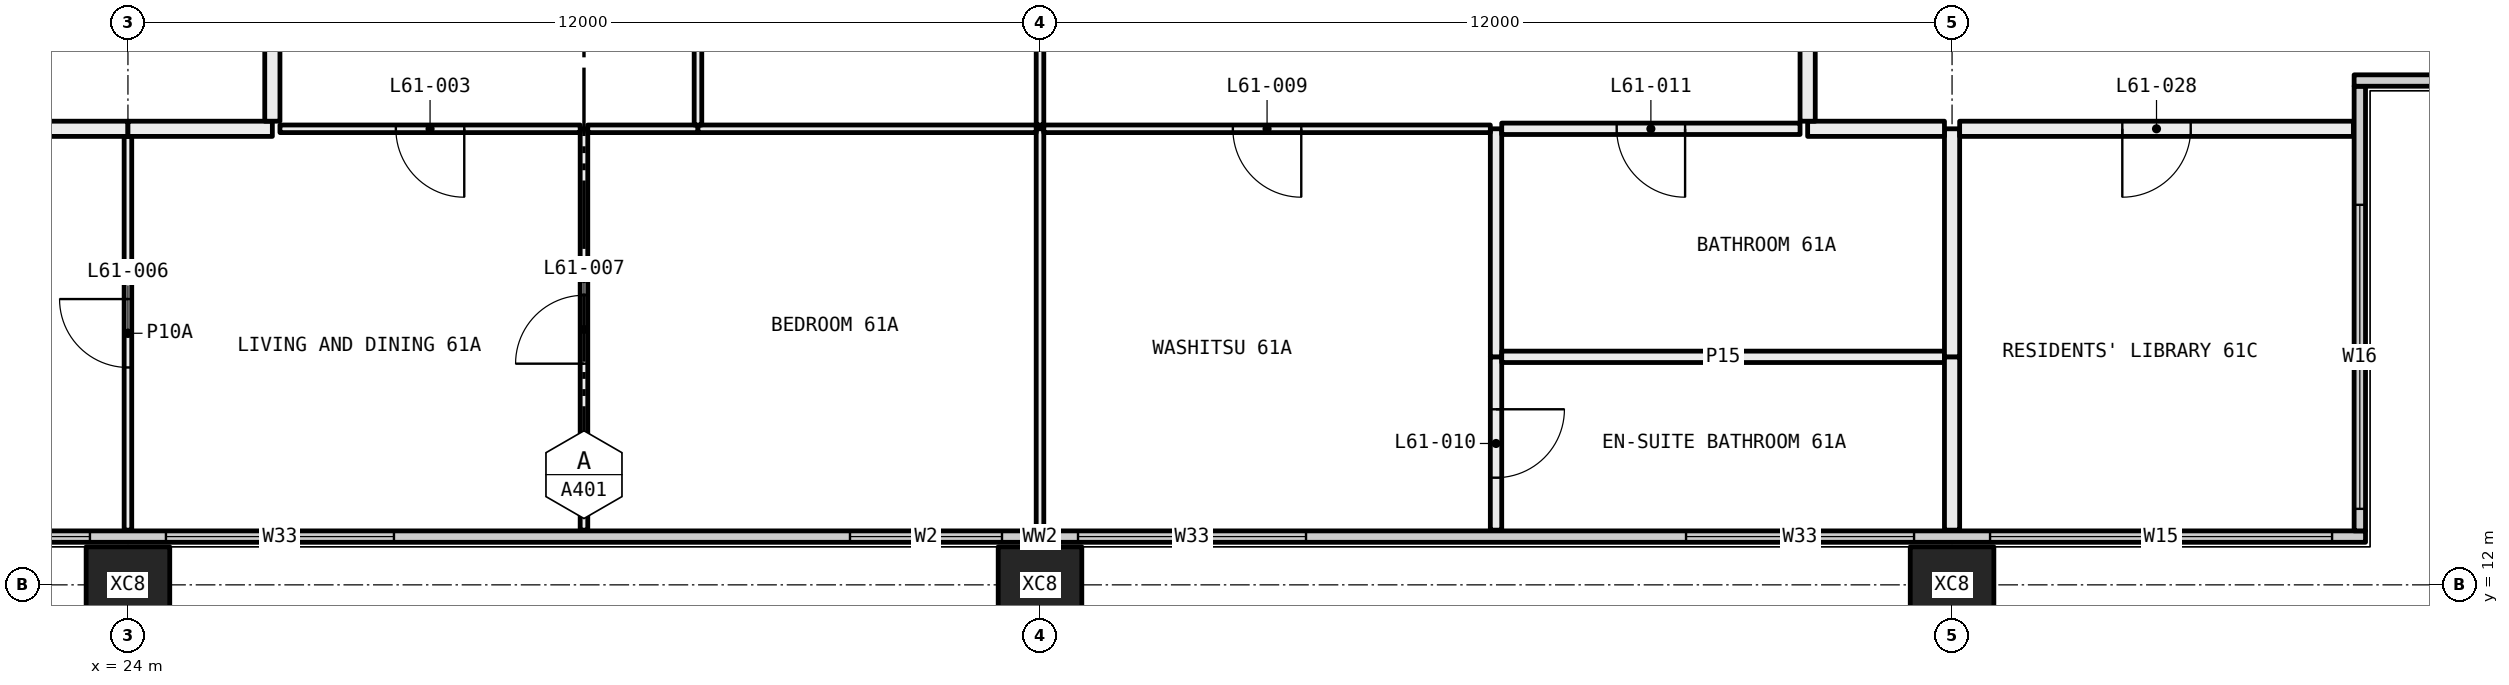
"""IFC4 building model, lengths in metres.
Left out: names, types, materials, properties, quantities, classifications, styles, units other than length and angle.
Written with IfcOpenShell. Run it as: python <this file> out.ifc"""

import sys

from ifc_helpers import new_model, si_unit, direction, frame, frame_2d, origin, origin_2d, place, context, subcontext, project, spatial, rectangle, hollow_rectangle, extrude, element, fill, save


model = new_model("IFC4")
c1 = context("Model", 3, precision=1e-05, world=origin(), true_north=direction((0.0, 1.0)))
c2 = subcontext(c1, "Body", "Model", "MODEL_VIEW")
j1 = project(units=[si_unit("LENGTHUNIT", "METRE"), si_unit("PLANEANGLEUNIT", "RADIAN")], contexts=[c1])
p1 = place(None, origin())
s1 = spatial("IfcSite", under=j1, at=p1, CompositionType="ELEMENT")
p2 = place(p1, origin())
s2 = spatial("IfcBuilding", under=s1, at=p2, CompositionType="ELEMENT")
p3 = place(p2, frame((0.0, 0.0, 228.3)))
s3 = spatial("IfcBuildingStorey", under=s2, at=p3, CompositionType="ELEMENT", Elevation=228.3)
for number, where, z_axis, x_axis in (
    (1, (24.0, 12.0, -0.4), (0.0, 0.0, 1.0), (1.0, 0.0, 0.0)),
    (2, (36.0, 12.0, -0.4), (0.0, 0.0, 1.0), (1.0, 0.0, 0.0)),
    (3, (48.0, 12.0, -0.4), (0.0, 0.0, 1.0), (1.0, 0.0, 0.0)),
):
    element("IfcColumn", number, at=place(p3, frame(where, z_axis=z_axis, x_axis=x_axis)), inside=s3, PredefinedType="COLUMN", context=c2, shape_type="SweptSolid", body=[
        extrude(hollow_rectangle(XDim=1.1, YDim=1.0, WallThickness=0.04, at=origin_2d()), origin(), (0.0, 0.0, 1.0), 3.45),
    ])
p4 = place(p3, frame((18.56, 12.635, 0.0), z_axis=(0.0, 0.0, 1.0), x_axis=(1.0, 0.0, 0.0)))
e4 = element("IfcWall", 4, at=p4, inside=s3, PredefinedType="ELEMENTEDWALL", context=c2, shape_type="SweptSolid", body=[
    extrude(rectangle(XDim=34.88, YDim=0.15, at=frame_2d((17.44, 0.0))), origin(), (0.0, 0.0, 1.0), 3.05),
])
p5 = place(p4, frame((0.44, 0.0, 0.45)))
e5 = element("IfcOpeningElement", 5, at=p5, cuts=e4, PredefinedType="OPENING", context=c2, shape_type="SweptSolid", body=[
    extrude(rectangle(XDim=4.5, YDim=2.55, at=frame_2d((2.25, 1.275))), frame((0.0, 0.085, 0.0), z_axis=(0.0, -1.0, 0.0), x_axis=(1.0, 0.0, 0.0)), (0.0, 0.0, 1.0), 0.17),
])
p6 = place(p4, frame((5.94, 0.0, 0.45)))
e6 = element("IfcOpeningElement", 6, at=p6, cuts=e4, PredefinedType="OPENING", context=c2, shape_type="SweptSolid", body=[
    extrude(rectangle(XDim=3.0, YDim=2.55, at=frame_2d((1.5, 1.275))), frame((0.0, 0.085, 0.0), z_axis=(0.0, -1.0, 0.0), x_axis=(1.0, 0.0, 0.0)), (0.0, 0.0, 1.0), 0.17),
])
p7 = place(p4, frame((14.94, 0.0, 0.45)))
e7 = element("IfcOpeningElement", 7, at=p7, cuts=e4, PredefinedType="OPENING", context=c2, shape_type="SweptSolid", body=[
    extrude(rectangle(XDim=2.0, YDim=2.55, at=frame_2d((1.0, 1.275))), frame((0.0, 0.085, 0.0), z_axis=(0.0, -1.0, 0.0), x_axis=(1.0, 0.0, 0.0)), (0.0, 0.0, 1.0), 0.17),
])
p8 = place(p4, frame((17.94, 0.0, 0.45)))
e8 = element("IfcOpeningElement", 8, at=p8, cuts=e4, PredefinedType="OPENING", context=c2, shape_type="SweptSolid", body=[
    extrude(rectangle(XDim=3.0, YDim=2.55, at=frame_2d((1.5, 1.275))), frame((0.0, 0.085, 0.0), z_axis=(0.0, -1.0, 0.0), x_axis=(1.0, 0.0, 0.0)), (0.0, 0.0, 1.0), 0.17),
])
p9 = place(p4, frame((25.94, 0.0, 0.45)))
e9 = element("IfcOpeningElement", 9, at=p9, cuts=e4, PredefinedType="OPENING", context=c2, shape_type="SweptSolid", body=[
    extrude(rectangle(XDim=3.0, YDim=2.55, at=frame_2d((1.5, 1.275))), frame((0.0, 0.085, 0.0), z_axis=(0.0, -1.0, 0.0), x_axis=(1.0, 0.0, 0.0)), (0.0, 0.0, 1.0), 0.17),
])
p10 = place(p4, frame((29.94, 0.0, 0.45)))
e10 = element("IfcOpeningElement", 10, at=p10, cuts=e4, PredefinedType="OPENING", context=c2, shape_type="SweptSolid", body=[
    extrude(rectangle(XDim=4.5, YDim=2.55, at=frame_2d((2.25, 1.275))), frame((0.0, 0.085, 0.0), z_axis=(0.0, -1.0, 0.0), x_axis=(1.0, 0.0, 0.0)), (0.0, 0.0, 1.0), 0.17),
])
p11 = place(p3, frame((53.365, 12.71, 0.0), z_axis=(0.0, 0.0, 1.0), x_axis=(0.0, 1.0, 0.0)))
e11 = element("IfcWall", 11, at=p11, inside=s3, PredefinedType="ELEMENTEDWALL", context=c2, shape_type="SweptSolid", body=[
    extrude(rectangle(XDim=5.85, YDim=0.15, at=frame_2d((2.925, 0.0))), origin(), (0.0, 0.0, 1.0), 3.05),
])
p12 = place(p11, frame((0.29, 0.0, 0.45)))
e12 = element("IfcOpeningElement", 12, at=p12, cuts=e11, PredefinedType="OPENING", context=c2, shape_type="SweptSolid", body=[
    extrude(rectangle(XDim=4.0, YDim=2.55, at=frame_2d((2.0, 1.275))), frame((0.0, 0.085, 0.0), z_axis=(0.0, -1.0, 0.0), x_axis=(1.0, 0.0, 0.0)), (0.0, 0.0, 1.0), 0.17),
])
p13 = place(p3, frame((53.29, 18.635, 0.0), z_axis=(0.0, 0.0, 1.0), x_axis=(1.0, 0.0, 0.0)))
e13 = element("IfcWall", 13, at=p13, inside=s3, PredefinedType="ELEMENTEDWALL", context=c2, shape_type="SweptSolid", body=[
    extrude(rectangle(XDim=6.15, YDim=0.15, at=frame_2d((3.075, 0.0))), origin(), (0.0, 0.0, 1.0), 3.05),
])
p14 = place(p13, frame((1.71, 0.0, 0.45)))
e14 = element("IfcOpeningElement", 14, at=p14, cuts=e13, PredefinedType="OPENING", context=c2, shape_type="SweptSolid", body=[
    extrude(rectangle(XDim=4.0, YDim=2.55, at=frame_2d((2.0, 1.275))), frame((0.0, 0.085, 0.0), z_axis=(0.0, -1.0, 0.0), x_axis=(1.0, 0.0, 0.0)), (0.0, 0.0, 1.0), 0.17),
])
p15 = place(p3, frame((24.0, 12.72, 0.0), z_axis=(0.0, 0.0, 1.0), x_axis=(0.0, 1.0, 0.0)))
e15 = element("IfcWall", 15, at=p15, inside=s3, PredefinedType="PARTITIONING", context=c2, shape_type="SweptSolid", body=[
    extrude(rectangle(XDim=5.18, YDim=0.1, at=frame_2d((2.59, 0.0))), origin(), (0.0, 0.0, 1.0), 3.05),
])
p16 = place(p15, frame((2.14, 0.0, 0.0)))
e16 = element("IfcOpeningElement", 16, at=p16, cuts=e15, PredefinedType="OPENING", context=c2, shape_type="SweptSolid", body=[
    extrude(rectangle(XDim=0.9, YDim=2.1, at=frame_2d((0.45, 1.05))), frame((0.0, 0.06, 0.0), z_axis=(0.0, -1.0, 0.0), x_axis=(1.0, 0.0, 0.0)), (0.0, 0.0, 1.0), 0.12),
])
p17 = place(p3, frame((24.0, 18.0, 0.0), z_axis=(0.0, 0.0, 1.0), x_axis=(-1.0, 0.0, 0.0)))
e17 = element("IfcWall", 17, at=p17, inside=s3, PredefinedType="PARTITIONING", context=c2, shape_type="SweptSolid", body=[
    extrude(rectangle(XDim=5.28, YDim=0.2, at=frame_2d((2.64, 0.0))), origin(), (0.0, 0.0, 1.0), 3.05),
])
p18 = place(p3, frame((30.0, 12.72, 0.0), z_axis=(0.0, 0.0, 1.0), x_axis=(0.0, 1.0, 0.0)))
e18 = element("IfcWall", 18, at=p18, inside=s3, PredefinedType="PARTITIONING", context=c2, shape_type="SweptSolid", body=[
    extrude(rectangle(XDim=5.28, YDim=0.1, at=frame_2d((2.64, 0.0))), origin(), (0.0, 0.0, 1.0), 3.05),
])
p19 = place(p18, frame((2.19, 0.0, 0.0)))
e19 = element("IfcOpeningElement", 19, at=p19, cuts=e18, PredefinedType="OPENING", context=c2, shape_type="SweptSolid", body=[
    extrude(rectangle(XDim=0.9, YDim=2.1, at=frame_2d((0.45, 1.05))), frame((0.0, 0.06, 0.0), z_axis=(0.0, -1.0, 0.0), x_axis=(1.0, 0.0, 0.0)), (0.0, 0.0, 1.0), 0.12),
])
p20 = place(p3, frame((29.95, 18.0, 0.0), z_axis=(0.0, 0.0, 1.0), x_axis=(-1.0, 0.0, 0.0)))
e20 = element("IfcWall", 20, at=p20, inside=s3, PredefinedType="PARTITIONING", context=c2, shape_type="SweptSolid", body=[
    extrude(rectangle(XDim=3.95, YDim=0.1, at=frame_2d((1.975, 0.0))), origin(), (0.0, 0.0, 1.0), 3.05),
])
p21 = place(p20, frame((1.525, 0.0, 0.0)))
e21 = element("IfcOpeningElement", 21, at=p21, cuts=e20, PredefinedType="OPENING", context=c2, shape_type="SweptSolid", body=[
    extrude(rectangle(XDim=0.9, YDim=2.1, at=frame_2d((0.45, 1.05))), frame((0.0, 0.06, 0.0), z_axis=(0.0, -1.0, 0.0), x_axis=(1.0, 0.0, 0.0)), (0.0, 0.0, 1.0), 0.12),
])
p22 = place(p3, frame((25.9, 18.0, 0.0), z_axis=(0.0, 0.0, 1.0), x_axis=(-1.0, 0.0, 0.0)))
e22 = element("IfcWall", 22, at=p22, inside=s3, PredefinedType="PARTITIONING", context=c2, shape_type="SweptSolid", body=[
    extrude(rectangle(XDim=1.9, YDim=0.2, at=frame_2d((0.95, 0.0))), origin(), (0.0, 0.0, 1.0), 3.05),
])
p23 = place(p3, frame((36.0, 12.72, 0.0), z_axis=(0.0, 0.0, 1.0), x_axis=(0.0, 1.0, 0.0)))
e23 = element("IfcWall", 23, at=p23, inside=s3, PredefinedType="PARTITIONING", context=c2, shape_type="SweptSolid", body=[
    extrude(rectangle(XDim=5.28, YDim=0.1, at=frame_2d((2.64, 0.0))), origin(), (0.0, 0.0, 1.0), 2.45),
])
p24 = place(p3, frame((31.5, 18.0, 0.0), z_axis=(0.0, 0.0, 1.0), x_axis=(-1.0, 0.0, 0.0)))
e24 = element("IfcWall", 24, at=p24, inside=s3, PredefinedType="PARTITIONING", context=c2, shape_type="SweptSolid", body=[
    extrude(rectangle(XDim=1.45, YDim=0.1, at=frame_2d((0.725, 0.0))), origin(), (0.0, 0.0, 1.0), 3.05),
])
p25 = place(p3, frame((35.95, 18.0, 0.0), z_axis=(0.0, 0.0, 1.0), x_axis=(-1.0, 0.0, 0.0)))
e25 = element("IfcWall", 25, at=p25, inside=s3, PredefinedType="PARTITIONING", context=c2, shape_type="SweptSolid", body=[
    extrude(rectangle(XDim=4.45, YDim=0.1, at=frame_2d((2.225, 0.0))), origin(), (0.0, 0.0, 1.0), 2.45),
])
p26 = place(p3, frame((42.0, 12.72, 0.0), z_axis=(0.0, 0.0, 1.0), x_axis=(0.0, 1.0, 0.0)))
e26 = element("IfcWall", 26, at=p26, inside=s3, PredefinedType="PARTITIONING", context=c2, shape_type="SweptSolid", body=[
    extrude(rectangle(XDim=2.28, YDim=0.15, at=frame_2d((1.14, 0.0))), origin(), (0.0, 0.0, 1.0), 3.05),
])
p27 = place(p26, frame((0.69, 0.0, 0.0)))
e27 = element("IfcOpeningElement", 27, at=p27, cuts=e26, PredefinedType="OPENING", context=c2, shape_type="SweptSolid", body=[
    extrude(rectangle(XDim=0.9, YDim=2.1, at=frame_2d((0.45, 1.05))), frame((0.0, 0.085, 0.0), z_axis=(0.0, -1.0, 0.0), x_axis=(1.0, 0.0, 0.0)), (0.0, 0.0, 1.0), 0.17),
])
p28 = place(p3, frame((42.0, 15.0, 0.0), z_axis=(0.0, 0.0, 1.0), x_axis=(0.0, 1.0, 0.0)))
e28 = element("IfcWall", 28, at=p28, inside=s3, PredefinedType="PARTITIONING", context=c2, shape_type="SweptSolid", body=[
    extrude(rectangle(XDim=3.0, YDim=0.15, at=frame_2d((1.5, 0.0))), origin(), (0.0, 0.0, 1.0), 3.05),
])
p29 = place(p3, frame((41.925, 18.0, 0.0), z_axis=(0.0, 0.0, 1.0), x_axis=(-1.0, 0.0, 0.0)))
e29 = element("IfcWall", 29, at=p29, inside=s3, PredefinedType="PARTITIONING", context=c2, shape_type="SweptSolid", body=[
    extrude(rectangle(XDim=5.875, YDim=0.1, at=frame_2d((2.938, 0.0))), origin(), (0.0, 0.0, 1.0), 2.45),
])
p30 = place(p29, frame((2.488, 0.0, 0.0)))
e30 = element("IfcOpeningElement", 30, at=p30, cuts=e29, PredefinedType="OPENING", context=c2, shape_type="SweptSolid", body=[
    extrude(rectangle(XDim=0.9, YDim=2.1, at=frame_2d((0.45, 1.05))), frame((0.0, 0.06, 0.0), z_axis=(0.0, -1.0, 0.0), x_axis=(1.0, 0.0, 0.0)), (0.0, 0.0, 1.0), 0.12),
])
p31 = place(p3, frame((47.9, 15.0, 0.0), z_axis=(0.0, 0.0, 1.0), x_axis=(-1.0, 0.0, 0.0)))
e31 = element("IfcWall", 31, at=p31, inside=s3, PredefinedType="PARTITIONING", context=c2, shape_type="SweptSolid", body=[
    extrude(rectangle(XDim=5.825, YDim=0.15, at=frame_2d((2.913, 0.0))), origin(), (0.0, 0.0, 1.0), 3.05),
])
p32 = place(p3, frame((48.0, 12.72, 0.0), z_axis=(0.0, 0.0, 1.0), x_axis=(0.0, 1.0, 0.0)))
e32 = element("IfcWall", 32, at=p32, inside=s3, PredefinedType="PARTITIONING", context=c2, shape_type="SweptSolid", body=[
    extrude(rectangle(XDim=2.28, YDim=0.2, at=frame_2d((1.14, 0.0))), origin(), (0.0, 0.0, 1.0), 3.05),
])
p33 = place(p3, frame((46.0, 18.0, 0.0), z_axis=(0.0, 0.0, 1.0), x_axis=(-1.0, 0.0, 0.0)))
e33 = element("IfcWall", 33, at=p33, inside=s3, PredefinedType="PARTITIONING", context=c2, shape_type="SweptSolid", body=[
    extrude(rectangle(XDim=3.925, YDim=0.15, at=frame_2d((1.962, 0.0))), origin(), (0.0, 0.0, 1.0), 3.05),
])
p34 = place(p33, frame((1.512, 0.0, 0.0)))
e34 = element("IfcOpeningElement", 34, at=p34, cuts=e33, PredefinedType="OPENING", context=c2, shape_type="SweptSolid", body=[
    extrude(rectangle(XDim=0.9, YDim=2.1, at=frame_2d((0.45, 1.05))), frame((0.0, 0.085, 0.0), z_axis=(0.0, -1.0, 0.0), x_axis=(1.0, 0.0, 0.0)), (0.0, 0.0, 1.0), 0.17),
])
p35 = place(p3, frame((48.0, 15.0, 0.0), z_axis=(0.0, 0.0, 1.0), x_axis=(0.0, 1.0, 0.0)))
e35 = element("IfcWall", 35, at=p35, inside=s3, PredefinedType="PARTITIONING", context=c2, shape_type="SweptSolid", body=[
    extrude(rectangle(XDim=3.0, YDim=0.2, at=frame_2d((1.5, 0.0))), origin(), (0.0, 0.0, 1.0), 3.05),
])
p36 = place(p3, frame((47.9, 18.0, 0.0), z_axis=(0.0, 0.0, 1.0), x_axis=(-1.0, 0.0, 0.0)))
e36 = element("IfcWall", 36, at=p36, inside=s3, PredefinedType="PARTITIONING", context=c2, shape_type="SweptSolid", body=[
    extrude(rectangle(XDim=1.8, YDim=0.2, at=frame_2d((0.9, 0.0))), origin(), (0.0, 0.0, 1.0), 3.05),
])
p37 = place(p3, frame((31.5, 18.05, 0.0), z_axis=(0.0, 0.0, 1.0), x_axis=(0.0, 1.0, 0.0)))
e37 = element("IfcWall", 37, at=p37, inside=s3, PredefinedType="PARTITIONING", context=c2, shape_type="SweptSolid", body=[
    extrude(rectangle(XDim=6.175, YDim=0.1, at=frame_2d((3.087, 0.0))), origin(), (0.0, 0.0, 1.0), 2.45),
])
p38 = place(p37, frame((2.637, 0.0, 0.0)))
e38 = element("IfcOpeningElement", 38, at=p38, cuts=e37, PredefinedType="OPENING", context=c2, shape_type="SweptSolid", body=[
    extrude(rectangle(XDim=0.9, YDim=2.1, at=frame_2d((0.45, 1.05))), frame((0.0, 0.06, 0.0), z_axis=(0.0, -1.0, 0.0), x_axis=(1.0, 0.0, 0.0)), (0.0, 0.0, 1.0), 0.12),
])
p39 = place(p3, frame((25.9, 23.9, 0.0), z_axis=(0.0, 0.0, 1.0), x_axis=(0.0, -1.0, 0.0)))
e39 = element("IfcWall", 39, at=p39, inside=s3, PredefinedType="PARTITIONING", context=c2, shape_type="SweptSolid", body=[
    extrude(rectangle(XDim=5.8, YDim=0.2, at=frame_2d((2.9, 0.0))), origin(), (0.0, 0.0, 1.0), 3.05),
])
p40 = place(p3, frame((36.0, 18.05, 0.0), z_axis=(0.0, 0.0, 1.0), x_axis=(0.0, 1.0, 0.0)))
e40 = element("IfcWall", 40, at=p40, inside=s3, PredefinedType="PARTITIONING", context=c2, shape_type="SweptSolid", body=[
    extrude(rectangle(XDim=5.4, YDim=0.1, at=frame_2d((2.7, 0.0))), origin(), (0.0, 0.0, 1.0), 2.45),
])
p41 = place(p40, frame((2.25, 0.0, 0.0)))
e41 = element("IfcOpeningElement", 41, at=p41, cuts=e40, PredefinedType="OPENING", context=c2, shape_type="SweptSolid", body=[
    extrude(rectangle(XDim=0.9, YDim=2.1, at=frame_2d((0.45, 1.05))), frame((0.0, 0.06, 0.0), z_axis=(0.0, -1.0, 0.0), x_axis=(1.0, 0.0, 0.0)), (0.0, 0.0, 1.0), 0.12),
])
p42 = place(p3, frame((46.1, 18.1, 0.0), z_axis=(0.0, 0.0, 1.0), x_axis=(0.0, 1.0, 0.0)))
e42 = element("IfcWall", 42, at=p42, inside=s3, PredefinedType="PARTITIONING", context=c2, shape_type="SweptSolid", body=[
    extrude(rectangle(XDim=6.2, YDim=0.2, at=frame_2d((3.1, 0.0))), origin(), (0.0, 0.0, 1.0), 2.45),
])
p43 = place(p3, frame((53.28, 18.0, 0.0), z_axis=(0.0, 0.0, 1.0), x_axis=(-1.0, 0.0, 0.0)))
e43 = element("IfcWall", 43, at=p43, inside=s3, PredefinedType="PARTITIONING", context=c2, shape_type="SweptSolid", body=[
    extrude(rectangle(XDim=5.18, YDim=0.2, at=frame_2d((2.59, 0.0))), origin(), (0.0, 0.0, 1.0), 3.05),
])
p44 = place(p43, frame((2.14, 0.0, 0.0)))
e44 = element("IfcOpeningElement", 44, at=p44, cuts=e43, PredefinedType="OPENING", context=c2, shape_type="SweptSolid", body=[
    extrude(rectangle(XDim=0.9, YDim=2.1, at=frame_2d((0.45, 1.05))), frame((0.0, 0.11, 0.0), z_axis=(0.0, -1.0, 0.0), x_axis=(1.0, 0.0, 0.0)), (0.0, 0.0, 1.0), 0.22),
])
p45 = place(p5, origin())
e45 = element("IfcWindow", 45, at=p45, inside=s3, PartitioningType="SINGLE_PANEL", PredefinedType="WINDOW", context=c2, shape_type="SweptSolid", body=[
    extrude(rectangle(XDim=4.5, YDim=2.55, at=frame_2d((2.25, 1.275))), frame((0.0, 0.03, 0.0), z_axis=(0.0, -1.0, 0.0), x_axis=(1.0, 0.0, 0.0)), (0.0, 0.0, 1.0), 0.06),
])
fill(e5, e45)
p46 = place(p6, origin())
e46 = element("IfcWindow", 46, at=p46, inside=s3, PartitioningType="SINGLE_PANEL", PredefinedType="WINDOW", context=c2, shape_type="SweptSolid", body=[
    extrude(rectangle(XDim=3.0, YDim=2.55, at=frame_2d((1.5, 1.275))), frame((0.0, 0.03, 0.0), z_axis=(0.0, -1.0, 0.0), x_axis=(1.0, 0.0, 0.0)), (0.0, 0.0, 1.0), 0.06),
])
fill(e6, e46)
p47 = place(p7, origin())
e47 = element("IfcWindow", 47, at=p47, inside=s3, PartitioningType="SINGLE_PANEL", PredefinedType="WINDOW", context=c2, shape_type="SweptSolid", body=[
    extrude(rectangle(XDim=2.0, YDim=2.55, at=frame_2d((1.0, 1.275))), frame((0.0, 0.03, 0.0), z_axis=(0.0, -1.0, 0.0), x_axis=(1.0, 0.0, 0.0)), (0.0, 0.0, 1.0), 0.06),
])
fill(e7, e47)
p48 = place(p8, origin())
e48 = element("IfcWindow", 48, at=p48, inside=s3, PartitioningType="SINGLE_PANEL", PredefinedType="WINDOW", context=c2, shape_type="SweptSolid", body=[
    extrude(rectangle(XDim=3.0, YDim=2.55, at=frame_2d((1.5, 1.275))), frame((0.0, 0.03, 0.0), z_axis=(0.0, -1.0, 0.0), x_axis=(1.0, 0.0, 0.0)), (0.0, 0.0, 1.0), 0.06),
])
fill(e8, e48)
p49 = place(p9, origin())
e49 = element("IfcWindow", 49, at=p49, inside=s3, PartitioningType="SINGLE_PANEL", PredefinedType="WINDOW", context=c2, shape_type="SweptSolid", body=[
    extrude(rectangle(XDim=3.0, YDim=2.55, at=frame_2d((1.5, 1.275))), frame((0.0, 0.03, 0.0), z_axis=(0.0, -1.0, 0.0), x_axis=(1.0, 0.0, 0.0)), (0.0, 0.0, 1.0), 0.06),
])
fill(e9, e49)
p50 = place(p10, origin())
e50 = element("IfcWindow", 50, at=p50, inside=s3, PartitioningType="SINGLE_PANEL", PredefinedType="WINDOW", context=c2, shape_type="SweptSolid", body=[
    extrude(rectangle(XDim=4.5, YDim=2.55, at=frame_2d((2.25, 1.275))), frame((0.0, 0.03, 0.0), z_axis=(0.0, -1.0, 0.0), x_axis=(1.0, 0.0, 0.0)), (0.0, 0.0, 1.0), 0.06),
])
fill(e10, e50)
p51 = place(p12, origin())
e51 = element("IfcWindow", 51, at=p51, inside=s3, PartitioningType="SINGLE_PANEL", PredefinedType="WINDOW", context=c2, shape_type="SweptSolid", body=[
    extrude(rectangle(XDim=4.0, YDim=2.55, at=frame_2d((2.0, 1.275))), frame((0.0, 0.03, 0.0), z_axis=(0.0, -1.0, 0.0), x_axis=(1.0, 0.0, 0.0)), (0.0, 0.0, 1.0), 0.06),
])
fill(e12, e51)
p52 = place(p21, origin())
e52 = element("IfcDoor", 52, at=p52, inside=s3, OperationType="SINGLE_SWING_RIGHT", PredefinedType="DOOR", context=c2, shape_type="SweptSolid", body=[
    extrude(rectangle(XDim=0.9, YDim=2.1, at=frame_2d((0.45, 1.05))), frame((0.0, 0.025, 0.0), z_axis=(0.0, -1.0, 0.0), x_axis=(1.0, 0.0, 0.0)), (0.0, 0.0, 1.0), 0.05),
])
fill(e21, e52)
p53 = place(p16, origin())
e53 = element("IfcDoor", 53, at=p53, inside=s3, OperationType="SINGLE_SWING_LEFT", PredefinedType="DOOR", context=c2, shape_type="SweptSolid", body=[
    extrude(rectangle(XDim=0.9, YDim=2.1, at=frame_2d((0.45, 1.05))), frame((0.0, 0.025, 0.0), z_axis=(0.0, -1.0, 0.0), x_axis=(1.0, 0.0, 0.0)), (0.0, 0.0, 1.0), 0.05),
])
fill(e16, e53)
p54 = place(p19, origin())
e54 = element("IfcDoor", 54, at=p54, inside=s3, OperationType="SINGLE_SWING_RIGHT", PredefinedType="DOOR", context=c2, shape_type="SweptSolid", body=[
    extrude(rectangle(XDim=0.9, YDim=2.1, at=frame_2d((0.45, 1.05))), frame((0.0, 0.025, 0.0), z_axis=(0.0, -1.0, 0.0), x_axis=(1.0, 0.0, 0.0)), (0.0, 0.0, 1.0), 0.05),
])
fill(e19, e54)
p55 = place(p30, origin())
e55 = element("IfcDoor", 55, at=p55, inside=s3, OperationType="SINGLE_SWING_RIGHT", PredefinedType="DOOR", context=c2, shape_type="SweptSolid", body=[
    extrude(rectangle(XDim=0.9, YDim=2.1, at=frame_2d((0.45, 1.05))), frame((0.0, 0.025, 0.0), z_axis=(0.0, -1.0, 0.0), x_axis=(1.0, 0.0, 0.0)), (0.0, 0.0, 1.0), 0.05),
])
fill(e30, e55)
p56 = place(p27, frame((0.9, 0.0, 0.0), x_axis=(-1.0, 0.0, 0.0)))
e56 = element("IfcDoor", 56, at=p56, inside=s3, OperationType="SINGLE_SWING_RIGHT", PredefinedType="DOOR", context=c2, shape_type="SweptSolid", body=[
    extrude(rectangle(XDim=0.9, YDim=2.1, at=frame_2d((0.45, 1.05))), frame((0.0, 0.025, 0.0), z_axis=(0.0, -1.0, 0.0), x_axis=(1.0, 0.0, 0.0)), (0.0, 0.0, 1.0), 0.05),
])
fill(e27, e56)
p57 = place(p34, origin())
e57 = element("IfcDoor", 57, at=p57, inside=s3, OperationType="SINGLE_SWING_RIGHT", PredefinedType="DOOR", context=c2, shape_type="SweptSolid", body=[
    extrude(rectangle(XDim=0.9, YDim=2.1, at=frame_2d((0.45, 1.05))), frame((0.0, 0.025, 0.0), z_axis=(0.0, -1.0, 0.0), x_axis=(1.0, 0.0, 0.0)), (0.0, 0.0, 1.0), 0.05),
])
fill(e34, e57)
p58 = place(p44, origin())
e58 = element("IfcDoor", 58, at=p58, inside=s3, OperationType="SINGLE_SWING_LEFT", PredefinedType="DOOR", context=c2, shape_type="SweptSolid", body=[
    extrude(rectangle(XDim=0.9, YDim=2.1, at=frame_2d((0.45, 1.05))), frame((0.0, 0.025, 0.0), z_axis=(0.0, -1.0, 0.0), x_axis=(1.0, 0.0, 0.0)), (0.0, 0.0, 1.0), 0.05),
])
fill(e44, e58)
save(model, sys.argv[1])
